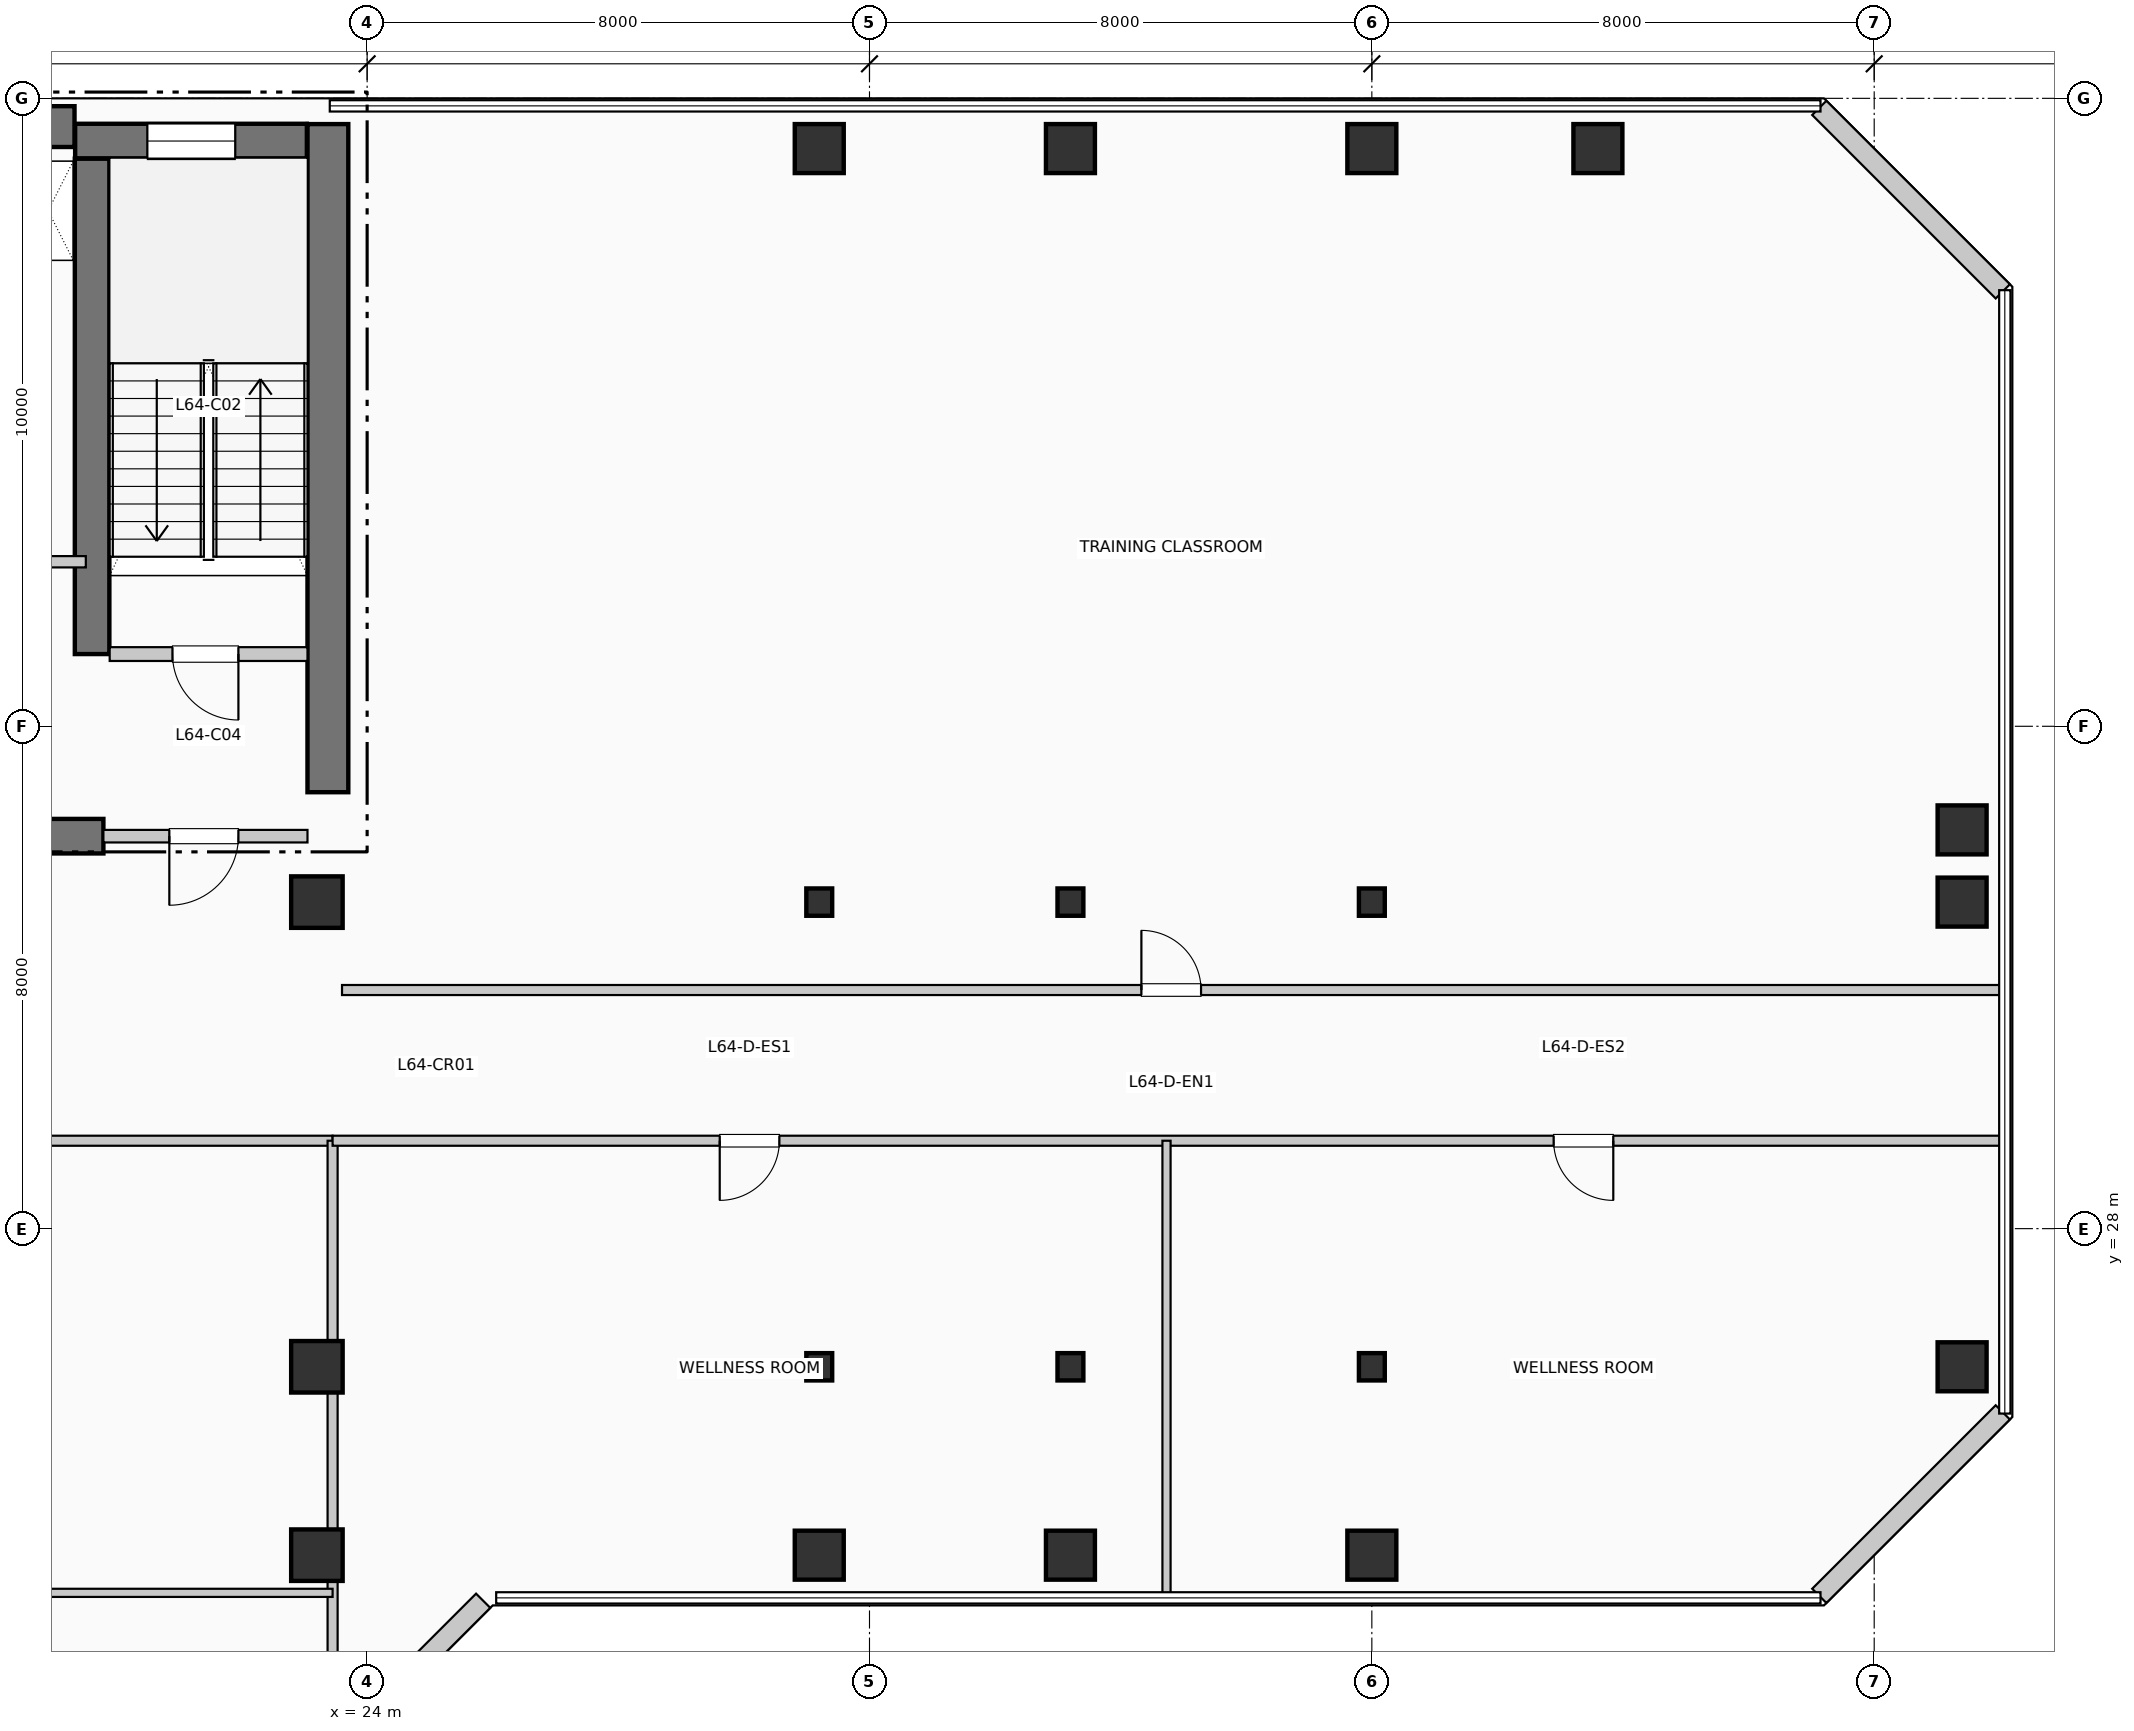
"""IFC4 building model, lengths in metres.
Left out: names, types, materials, properties, quantities, classifications, styles, units other than length and angle.
Written with IfcOpenShell. Run it as: python <this file> out.ifc"""

import sys

from ifc_helpers import new_model, si_unit, direction, frame, frame_2d, origin, origin_2d, place, context, subcontext, project, spatial, rectangle, i_section, extrude, element, fill, save


model = new_model("IFC4")
c1 = context("Model", 3, precision=1e-05, world=origin(), true_north=direction((0.0, 1.0)))
c2 = subcontext(c1, "Body", "Model", "MODEL_VIEW")
j1 = project(units=[si_unit("LENGTHUNIT", "METRE"), si_unit("PLANEANGLEUNIT", "RADIAN")], contexts=[c1])
p1 = place(None, origin())
s1 = spatial("IfcSite", under=j1, at=p1, CompositionType="ELEMENT")
p2 = place(p1, origin())
s2 = spatial("IfcBuilding", under=s1, at=p2, CompositionType="ELEMENT")
p3 = place(p2, frame((0.0, 0.0, 264.33)))
s3 = spatial("IfcBuildingStorey", under=s2, at=p3, CompositionType="ELEMENT", Elevation=264.33)
p4 = place(p3, frame((5.36, 45.55, 0.0), z_axis=(0.0, 0.0, 1.0), x_axis=(1.0, 0.0, 0.0)))
e1 = element("IfcWall", 1, at=p4, inside=s3, PredefinedType="SHEAR", context=c2, shape_type="SweptSolid", body=[
    extrude(rectangle(XDim=13.98, YDim=0.65, at=frame_2d((6.99, 0.0))), origin(), (0.0, 0.0, 1.0), 3.96),
])
p5 = place(p3, frame((23.375, 34.95, 0.0), z_axis=(0.0, 0.0, 1.0), x_axis=(0.0, 1.0, 0.0)))
e2 = element("IfcWall", 2, at=p5, inside=s3, PredefinedType="SHEAR", context=c2, shape_type="SweptSolid", body=[
    extrude(rectangle(XDim=10.64, YDim=0.65, at=frame_2d((5.32, 0.0))), origin(), (0.0, 0.0, 1.0), 3.96),
])
p6 = place(p3, frame((13.68, 34.25, 0.0), z_axis=(0.0, 0.0, 1.0), x_axis=(1.0, 0.0, 0.0)))
e3 = element("IfcWall", 3, at=p6, inside=s3, PredefinedType="SHEAR", context=c2, shape_type="SweptSolid", body=[
    extrude(rectangle(XDim=6.12, YDim=0.55, at=frame_2d((3.06, 0.0))), origin(), (0.0, 0.0, 1.0), 3.96),
])
p7 = place(p3, frame((19.62, 37.15, 0.0), z_axis=(0.0, 0.0, 1.0), x_axis=(0.0, 1.0, 0.0)))
e4 = element("IfcWall", 4, at=p7, inside=s3, PredefinedType="SHEAR", context=c2, shape_type="SweptSolid", body=[
    extrude(rectangle(XDim=7.89, YDim=0.55, at=frame_2d((3.945, 0.0))), origin(), (0.0, 0.0, 1.0), 3.96),
])
p8 = place(p3, frame((19.35, 45.32, 0.0), z_axis=(0.0, 0.0, 1.0), x_axis=(1.0, 0.0, 0.0)))
e5 = element("IfcWall", 5, at=p8, inside=s3, PredefinedType="SHEAR", context=c2, shape_type="SweptSolid", body=[
    extrude(rectangle(XDim=3.69, YDim=0.55, at=frame_2d((1.845, 0.0))), origin(), (0.0, 0.0, 1.0), 3.96),
])
p9 = place(p8, frame((1.15, 0.0, 1.05)))
e6 = element("IfcOpeningElement", 6, at=p9, cuts=e5, PredefinedType="OPENING", context=c2, shape_type="SweptSolid", body=[
    extrude(rectangle(XDim=1.4, YDim=1.8, at=frame_2d((0.7, 0.9))), frame((0.0, 0.285, 0.0), z_axis=(0.0, -1.0, 0.0), x_axis=(1.0, 0.0, 0.0)), (0.0, 0.0, 1.0), 0.57),
])
for number, where, z_axis, x_axis in (
    (7, (23.2, 22.8, 0.0), (0.0, 0.0, 1.0), (1.0, 0.0, 0.0)),
    (8, (23.2, 25.8, 0.0), (0.0, 0.0, 1.0), (1.0, 0.0, 0.0)),
    (9, (23.2, 33.2, 0.0), (0.0, 0.0, 1.0), (1.0, 0.0, 0.0)),
):
    element("IfcColumn", number, at=place(p3, frame(where, z_axis=z_axis, x_axis=x_axis)), inside=s3, PredefinedType="COLUMN", context=c2, shape_type="SweptSolid", body=[
        extrude(rectangle(XDim=0.82, YDim=0.82, at=origin_2d()), origin(), (0.0, 0.0, 1.0), 3.96),
    ])
p10 = place(p3, frame((31.2, 22.8, 0.0), z_axis=(0.0, 0.0, 1.0), x_axis=(1.0, 0.0, 0.0)))
e10 = element("IfcColumn", 10, at=p10, inside=s3, PredefinedType="COLUMN", context=c2, shape_type="SweptSolid", body=[
    extrude(rectangle(XDim=0.78, YDim=0.78, at=origin_2d()), origin(), (0.0, 0.0, 1.0), 3.96),
])
for number, where, z_axis, x_axis in (
    (11, (31.2, 25.8, 0.0), (0.0, 0.0, 1.0), (1.0, 0.0, 0.0)),
    (12, (31.2, 33.2, 0.0), (0.0, 0.0, 1.0), (1.0, 0.0, 0.0)),
):
    element("IfcColumn", number, at=place(p3, frame(where, z_axis=z_axis, x_axis=x_axis)), inside=s3, PredefinedType="COLUMN", context=c2, shape_type="SweptSolid", body=[
        extrude(i_section(OverallWidth=0.412, OverallDepth=0.435, WebThickness=0.027, FlangeThickness=0.043, at=origin_2d()), origin(), (0.0, 0.0, 1.0), 3.96),
    ])
for number, where, z_axis, x_axis in (
    (13, (31.2, 45.2, 0.0), (0.0, 0.0, 1.0), (1.0, 0.0, 0.0)),
    (14, (35.2, 22.8, 0.0), (0.0, 0.0, 1.0), (1.0, 0.0, 0.0)),
):
    element("IfcColumn", number, at=place(p3, frame(where, z_axis=z_axis, x_axis=x_axis)), inside=s3, PredefinedType="COLUMN", context=c2, shape_type="SweptSolid", body=[
        extrude(rectangle(XDim=0.78, YDim=0.78, at=origin_2d()), origin(), (0.0, 0.0, 1.0), 3.96),
    ])
for number, where, z_axis, x_axis in (
    (15, (35.2, 25.8, 0.0), (0.0, 0.0, 1.0), (1.0, 0.0, 0.0)),
    (16, (35.2, 33.2, 0.0), (0.0, 0.0, 1.0), (1.0, 0.0, 0.0)),
):
    element("IfcColumn", number, at=place(p3, frame(where, z_axis=z_axis, x_axis=x_axis)), inside=s3, PredefinedType="COLUMN", context=c2, shape_type="SweptSolid", body=[
        extrude(i_section(OverallWidth=0.412, OverallDepth=0.435, WebThickness=0.027, FlangeThickness=0.043, at=origin_2d()), origin(), (0.0, 0.0, 1.0), 3.96),
    ])
for number, where, z_axis, x_axis in (
    (17, (35.2, 45.2, 0.0), (0.0, 0.0, 1.0), (1.0, 0.0, 0.0)),
    (18, (40.0, 22.8, 0.0), (0.0, 0.0, 1.0), (1.0, 0.0, 0.0)),
):
    element("IfcColumn", number, at=place(p3, frame(where, z_axis=z_axis, x_axis=x_axis)), inside=s3, PredefinedType="COLUMN", context=c2, shape_type="SweptSolid", body=[
        extrude(rectangle(XDim=0.78, YDim=0.78, at=origin_2d()), origin(), (0.0, 0.0, 1.0), 3.96),
    ])
for number, where, z_axis, x_axis in (
    (19, (40.0, 25.8, 0.0), (0.0, 0.0, 1.0), (1.0, 0.0, 0.0)),
    (20, (40.0, 33.2, 0.0), (0.0, 0.0, 1.0), (1.0, 0.0, 0.0)),
):
    element("IfcColumn", number, at=place(p3, frame(where, z_axis=z_axis, x_axis=x_axis)), inside=s3, PredefinedType="COLUMN", context=c2, shape_type="SweptSolid", body=[
        extrude(i_section(OverallWidth=0.412, OverallDepth=0.435, WebThickness=0.027, FlangeThickness=0.043, at=origin_2d()), origin(), (0.0, 0.0, 1.0), 3.96),
    ])
for number, where, z_axis, x_axis in (
    (21, (40.0, 45.2, 0.0), (0.0, 0.0, 1.0), (1.0, 0.0, 0.0)),
    (22, (43.6, 45.2, 0.0), (0.0, 0.0, 1.0), (1.0, 0.0, 0.0)),
    (23, (49.4, 25.8, 0.0), (0.0, 0.0, 1.0), (1.0, 0.0, 0.0)),
    (24, (49.4, 33.2, 0.0), (0.0, 0.0, 1.0), (1.0, 0.0, 0.0)),
    (25, (49.4, 34.35, 0.0), (0.0, 0.0, 1.0), (1.0, 0.0, 0.0)),
):
    element("IfcColumn", number, at=place(p3, frame(where, z_axis=z_axis, x_axis=x_axis)), inside=s3, PredefinedType="COLUMN", context=c2, shape_type="SweptSolid", body=[
        extrude(rectangle(XDim=0.78, YDim=0.78, at=origin_2d()), origin(), (0.0, 0.0, 1.0), 3.96),
    ])
p11 = place(p3, frame((23.926, 20.152, 0.0), z_axis=(0.0, 0.0, 1.0), x_axis=(0.707106781187, 0.707106781187, 0.0)))
e26 = element("IfcWall", 26, at=p11, inside=s3, PredefinedType="SOLIDWALL", context=c2, shape_type="SweptSolid", body=[
    extrude(rectangle(XDim=2.718, YDim=0.32, at=frame_2d((1.359, 0.0))), origin(), (0.0, 0.0, 1.0), 3.71),
])
for number, where, z_axis, x_axis in (
    (27, (47.126, 22.152, 0.0), (0.0, 0.0, 1.0), (0.707, 0.707, 0.0)),
    (28, (50.048, 42.926, 0.0), (0.0, 0.0, 1.0), (-0.707, 0.707, 0.0)),
):
    element("IfcWall", number, at=place(p3, frame(where, z_axis=z_axis, x_axis=x_axis)), inside=s3, PredefinedType="SOLIDWALL", context=c2, shape_type="SweptSolid", body=[
        extrude(rectangle(XDim=4.133, YDim=0.32, at=frame_2d((2.066, 0.0))), origin(), (0.0, 0.0, 1.0), 3.71),
    ])
p12 = place(p3, frame((19.9, 37.15, 0.0), z_axis=(0.0, 0.0, 1.0), x_axis=(1.0, 0.0, 0.0)))
e29 = element("IfcWall", 29, at=p12, inside=s3, PredefinedType="PARTITIONING", context=c2, shape_type="SweptSolid", body=[
    extrude(rectangle(XDim=3.15, YDim=0.22, at=frame_2d((1.575, 0.0))), origin(), (0.0, 0.0, 1.0), 3.71),
])
p13 = place(p12, frame((2.05, 0.0, 0.0), z_axis=(0.0, 0.0, 1.0), x_axis=(-1.0, 0.0, 0.0)))
e30 = element("IfcOpeningElement", 30, at=p13, cuts=e29, PredefinedType="OPENING", context=c2, shape_type="SweptSolid", body=[
    extrude(rectangle(XDim=1.05, YDim=2.15, at=frame_2d((0.525, 1.075))), frame((0.0, 0.12, 0.0), z_axis=(0.0, -1.0, 0.0), x_axis=(1.0, 0.0, 0.0)), (0.0, 0.0, 1.0), 0.24),
])
p14 = place(p3, frame((19.8, 34.25, 0.0), z_axis=(0.0, 0.0, 1.0), x_axis=(1.0, 0.0, 0.0)))
e31 = element("IfcWall", 31, at=p14, inside=s3, PredefinedType="PARTITIONING", context=c2, shape_type="SweptSolid", body=[
    extrude(rectangle(XDim=3.25, YDim=0.2, at=frame_2d((1.625, 0.0))), origin(), (0.0, 0.0, 1.0), 3.71),
])
p15 = place(p14, frame((2.15, 0.0, 0.0), z_axis=(0.0, 0.0, 1.0), x_axis=(-1.0, 0.0, 0.0)))
e32 = element("IfcOpeningElement", 32, at=p15, cuts=e31, PredefinedType="OPENING", context=c2, shape_type="SweptSolid", body=[
    extrude(rectangle(XDim=1.1, YDim=2.15, at=frame_2d((0.55, 1.075))), frame((0.0, 0.11, 0.0), z_axis=(0.0, -1.0, 0.0), x_axis=(1.0, 0.0, 0.0)), (0.0, 0.0, 1.0), 0.22),
])
p16 = place(p3, frame((17.68, 38.62, 0.0), z_axis=(0.0, 0.0, 1.0), x_axis=(1.0, 0.0, 0.0)))
e33 = element("IfcWall", 33, at=p16, inside=s3, PredefinedType="PARTITIONING", context=c2, shape_type="SweptSolid", body=[
    extrude(rectangle(XDim=1.84, YDim=0.18, at=frame_2d((0.92, 0.0))), origin(), (0.0, 0.0, 1.0), 3.71),
])
p17 = place(p16, frame((0.24, 0.0, 0.0)))
e34 = element("IfcOpeningElement", 34, at=p17, cuts=e33, PredefinedType="OPENING", context=c2, shape_type="SweptSolid", body=[
    extrude(rectangle(XDim=0.92, YDim=2.1, at=frame_2d((0.46, 1.05))), frame((0.0, 0.1, 0.0), z_axis=(0.0, -1.0, 0.0), x_axis=(1.0, 0.0, 0.0)), (0.0, 0.0, 1.0), 0.2),
])
p18 = place(p3, frame((11.64, 29.4, 0.0), z_axis=(0.0, 0.0, 1.0), x_axis=(1.0, 0.0, 0.0)))
e35 = element("IfcWall", 35, at=p18, inside=s3, PredefinedType="PARTITIONING", context=c2, shape_type="SweptSolid", body=[
    extrude(rectangle(XDim=11.81, YDim=0.16, at=frame_2d((5.905, 0.0))), origin(), (0.0, 0.0, 1.0), 3.365),
])
p19 = place(p3, frame((23.45, 6.84, 0.0), z_axis=(0.0, 0.0, 1.0), x_axis=(0.0, 1.0, 0.0)))
e36 = element("IfcWall", 36, at=p19, inside=s3, PredefinedType="PARTITIONING", context=c2, shape_type="SweptSolid", body=[
    extrude(rectangle(XDim=22.56, YDim=0.16, at=frame_2d((11.28, 0.0))), origin(), (0.0, 0.0, 1.0), 3.095),
])
p20 = place(p3, frame((11.64, 22.2, 0.0), z_axis=(0.0, 0.0, 1.0), x_axis=(1.0, 0.0, 0.0)))
e37 = element("IfcWall", 37, at=p20, inside=s3, PredefinedType="PARTITIONING", context=c2, shape_type="SweptSolid", body=[
    extrude(rectangle(XDim=11.81, YDim=0.13, at=frame_2d((5.905, 0.0))), origin(), (0.0, 0.0, 1.0), 3.71),
])
p21 = place(p3, frame((23.45, 29.4, 0.0), z_axis=(0.0, 0.0, 1.0), x_axis=(1.0, 0.0, 0.0)))
e38 = element("IfcWall", 38, at=p21, inside=s3, PredefinedType="PARTITIONING", context=c2, shape_type="SweptSolid", body=[
    extrude(rectangle(XDim=26.56, YDim=0.16, at=frame_2d((13.28, 0.0))), origin(), (0.0, 0.0, 1.0), 3.365),
])
p22 = place(p21, frame((7.115, 0.0, 0.0), z_axis=(0.0, 0.0, 1.0), x_axis=(-1.0, 0.0, 0.0)))
e39 = element("IfcOpeningElement", 39, at=p22, cuts=e38, PredefinedType="OPENING", context=c2, shape_type="SweptSolid", body=[
    extrude(rectangle(XDim=0.95, YDim=2.15, at=frame_2d((0.475, 1.075))), frame((0.0, 0.09, 0.0), z_axis=(0.0, -1.0, 0.0), x_axis=(1.0, 0.0, 0.0)), (0.0, 0.0, 1.0), 0.18),
])
p23 = place(p21, frame((20.395, 0.0, 0.0), z_axis=(0.0, 0.0, 1.0), x_axis=(-1.0, 0.0, 0.0)))
e40 = element("IfcOpeningElement", 40, at=p23, cuts=e38, PredefinedType="OPENING", context=c2, shape_type="SweptSolid", body=[
    extrude(rectangle(XDim=0.95, YDim=2.15, at=frame_2d((0.475, 1.075))), frame((0.0, 0.09, 0.0), z_axis=(0.0, -1.0, 0.0), x_axis=(1.0, 0.0, 0.0)), (0.0, 0.0, 1.0), 0.18),
])
p24 = place(p3, frame((23.6, 31.8, 0.0), z_axis=(0.0, 0.0, 1.0), x_axis=(1.0, 0.0, 0.0)))
e41 = element("IfcWall", 41, at=p24, inside=s3, PredefinedType="PARTITIONING", context=c2, shape_type="SweptSolid", body=[
    extrude(rectangle(XDim=26.41, YDim=0.16, at=frame_2d((13.205, 0.0))), origin(), (0.0, 0.0, 1.0), 3.71),
])
p25 = place(p24, frame((12.73, 0.0, 0.0)))
e42 = element("IfcOpeningElement", 42, at=p25, cuts=e41, PredefinedType="OPENING", context=c2, shape_type="SweptSolid", body=[
    extrude(rectangle(XDim=0.95, YDim=2.15, at=frame_2d((0.475, 1.075))), frame((0.0, 0.09, 0.0), z_axis=(0.0, -1.0, 0.0), x_axis=(1.0, 0.0, 0.0)), (0.0, 0.0, 1.0), 0.18),
])
p26 = place(p3, frame((36.73, 22.19, 0.0), z_axis=(0.0, 0.0, 1.0), x_axis=(0.0, 1.0, 0.0)))
e43 = element("IfcWall", 43, at=p26, inside=s3, PredefinedType="PARTITIONING", context=c2, shape_type="SweptSolid", body=[
    extrude(rectangle(XDim=7.21, YDim=0.13, at=frame_2d((3.605, 0.0))), origin(), (0.0, 0.0, 1.0), 3.71),
])
p27 = place(p9, origin())
e44 = element("IfcWindow", 44, at=p27, inside=s3, PartitioningType="SINGLE_PANEL", PredefinedType="WINDOW", context=c2, shape_type="SweptSolid", body=[
    extrude(rectangle(XDim=1.4, YDim=1.8, at=frame_2d((0.7, 0.9))), frame((0.0, 0.03, 0.0), z_axis=(0.0, -1.0, 0.0), x_axis=(1.0, 0.0, 0.0)), (0.0, 0.0, 1.0), 0.06),
])
fill(e6, e44)
p28 = place(p13, origin())
e45 = element("IfcDoor", 45, at=p28, inside=s3, OperationType="SINGLE_SWING_RIGHT", PredefinedType="DOOR", context=c2, shape_type="SweptSolid", body=[
    extrude(rectangle(XDim=1.05, YDim=2.15, at=frame_2d((0.525, 1.075))), frame((0.0, 0.025, 0.0), z_axis=(0.0, -1.0, 0.0), x_axis=(1.0, 0.0, 0.0)), (0.0, 0.0, 1.0), 0.05),
])
fill(e30, e45)
p29 = place(p15, origin())
e46 = element("IfcDoor", 46, at=p29, inside=s3, OperationType="SINGLE_SWING_LEFT", PredefinedType="DOOR", context=c2, shape_type="SweptSolid", body=[
    extrude(rectangle(XDim=1.1, YDim=2.15, at=frame_2d((0.55, 1.075))), frame((0.0, 0.025, 0.0), z_axis=(0.0, -1.0, 0.0), x_axis=(1.0, 0.0, 0.0)), (0.0, 0.0, 1.0), 0.05),
])
fill(e32, e46)
p30 = place(p22, origin())
e47 = element("IfcDoor", 47, at=p30, inside=s3, OperationType="SINGLE_SWING_LEFT", PredefinedType="DOOR", context=c2, shape_type="SweptSolid", body=[
    extrude(rectangle(XDim=0.95, YDim=2.15, at=frame_2d((0.475, 1.075))), frame((0.0, 0.025, 0.0), z_axis=(0.0, -1.0, 0.0), x_axis=(1.0, 0.0, 0.0)), (0.0, 0.0, 1.0), 0.05),
])
fill(e39, e47)
p31 = place(p23, origin())
e48 = element("IfcDoor", 48, at=p31, inside=s3, OperationType="SINGLE_SWING_RIGHT", PredefinedType="DOOR", context=c2, shape_type="SweptSolid", body=[
    extrude(rectangle(XDim=0.95, YDim=2.15, at=frame_2d((0.475, 1.075))), frame((0.0, 0.025, 0.0), z_axis=(0.0, -1.0, 0.0), x_axis=(1.0, 0.0, 0.0)), (0.0, 0.0, 1.0), 0.05),
])
fill(e40, e48)
p32 = place(p25, origin())
e49 = element("IfcDoor", 49, at=p32, inside=s3, OperationType="SINGLE_SWING_LEFT", PredefinedType="DOOR", context=c2, shape_type="SweptSolid", body=[
    extrude(rectangle(XDim=0.95, YDim=2.15, at=frame_2d((0.475, 1.075))), frame((0.0, 0.025, 0.0), z_axis=(0.0, -1.0, 0.0), x_axis=(1.0, 0.0, 0.0)), (0.0, 0.0, 1.0), 0.05),
])
fill(e42, e49)
save(model, sys.argv[1])
